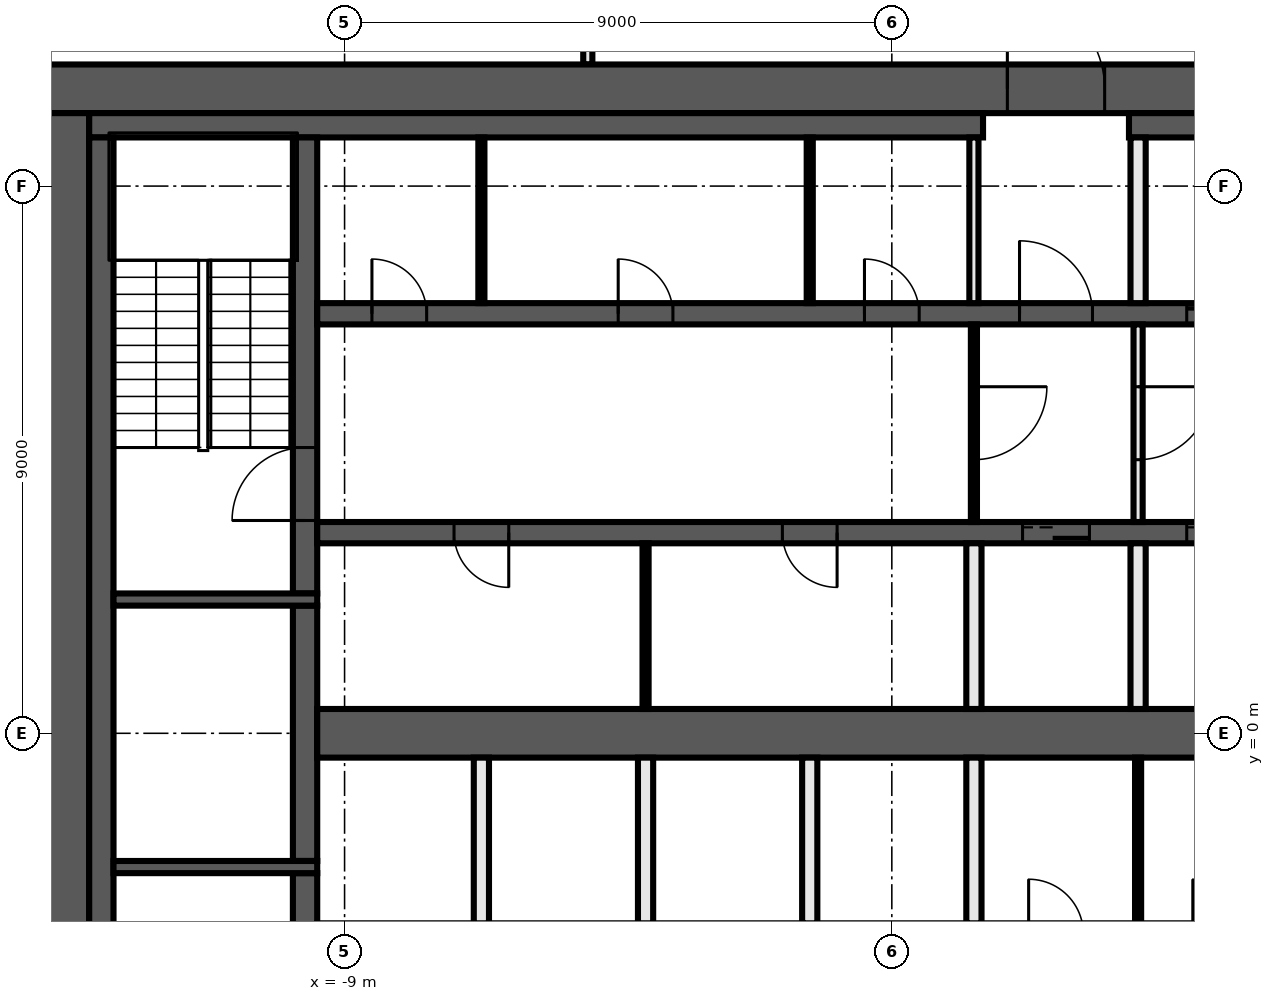
"""IFC4 building model, lengths in metres.
Left out: names, types, materials, properties, quantities, classifications, styles, units other than length and angle.
Written with IfcOpenShell. Run it as: python <this file> out.ifc"""

import sys

from ifc_helpers import new_model, si_unit, direction, frame, frame_2d, origin, place, context, subcontext, project, spatial, rectangle, extrude, element, fill, save


model = new_model("IFC4")
c1 = context("Model", 3, precision=1e-05, world=origin(), true_north=direction((0.0, 1.0)))
c2 = subcontext(c1, "Body", "Model", "MODEL_VIEW")
j1 = project(units=[si_unit("LENGTHUNIT", "METRE"), si_unit("PLANEANGLEUNIT", "RADIAN")], contexts=[c1])
p1 = place(None, origin())
s1 = spatial("IfcSite", under=j1, at=p1, CompositionType="ELEMENT")
p2 = place(p1, origin())
s2 = spatial("IfcBuilding", under=s1, at=p2, CompositionType="ELEMENT")
p3 = place(p2, frame((0.0, 0.0, 198.8)))
s3 = spatial("IfcBuildingStorey", under=s2, at=p3, CompositionType="ELEMENT", Elevation=198.8)
p4 = place(p3, frame((-5.0, 11.0, 0.0), z_axis=(0.0, 0.0, 1.0), x_axis=(0.0, 1.0, 0.0)))
e1 = element("IfcWall", 1, at=p4, inside=s3, PredefinedType="PARTITIONING", context=c2, shape_type="SweptSolid", body=[
    extrude(rectangle(XDim=3.125, YDim=0.15, at=frame_2d((1.562, 0.0))), origin(), (0.0, 0.0, 1.0), 3.82),
])
p5 = place(p3, frame((-14.0, 10.6, 0.0), z_axis=(0.0, 0.0, 1.0), x_axis=(1.0, 0.0, 0.0)))
e2 = element("IfcWall", 2, at=p5, inside=s3, PredefinedType="SHEAR", context=c2, shape_type="SweptSolid", body=[
    extrude(rectangle(XDim=28.0, YDim=0.8, at=frame_2d((14.0, 0.0))), origin(), (0.0, 0.0, 1.0), 3.82),
])
p6 = place(p5, frame((15.9, 0.0, 0.0)))
e3 = element("IfcOpeningElement", 3, at=p6, cuts=e2, PredefinedType="OPENING", context=c2, shape_type="SweptSolid", body=[
    extrude(rectangle(XDim=1.6, YDim=2.1, at=frame_2d((0.8, 1.05))), frame((0.0, 0.41, 0.0), z_axis=(0.0, -1.0, 0.0), x_axis=(1.0, 0.0, 0.0)), (0.0, 0.0, 1.0), 0.82),
])
p7 = place(p3, frame((-13.6, -10.2, 0.0), z_axis=(0.0, 0.0, 1.0), x_axis=(0.0, 1.0, 0.0)))
e4 = element("IfcWall", 4, at=p7, inside=s3, PredefinedType="SHEAR", context=c2, shape_type="SweptSolid", body=[
    extrude(rectangle(XDim=20.4, YDim=0.8, at=frame_2d((10.2, 0.0))), origin(), (0.0, 0.0, 1.0), 3.82),
])
p8 = place(p3, frame((-13.2, 10.0, 0.0), z_axis=(0.0, 0.0, 1.0), x_axis=(1.0, 0.0, 0.0)))
e5 = element("IfcWall", 5, at=p8, inside=s3, PredefinedType="SHEAR", context=c2, shape_type="SweptSolid", body=[
    extrude(rectangle(XDim=14.7, YDim=0.4, at=frame_2d((7.35, 0.0))), origin(), (0.0, 0.0, 1.0), 3.82),
])
p9 = place(p3, frame((3.9, 10.0, 0.0), z_axis=(0.0, 0.0, 1.0), x_axis=(1.0, 0.0, 0.0)))
e6 = element("IfcWall", 6, at=p9, inside=s3, PredefinedType="SHEAR", context=c2, shape_type="SweptSolid", body=[
    extrude(rectangle(XDim=9.3, YDim=0.4, at=frame_2d((4.65, 0.0))), origin(), (0.0, 0.0, 1.0), 3.82),
])
p10 = place(p3, frame((-13.0, -9.8, 0.0), z_axis=(0.0, 0.0, 1.0), x_axis=(0.0, 1.0, 0.0)))
e7 = element("IfcWall", 7, at=p10, inside=s3, PredefinedType="SHEAR", context=c2, shape_type="SweptSolid", body=[
    extrude(rectangle(XDim=19.6, YDim=0.4, at=frame_2d((9.8, 0.0))), origin(), (0.0, 0.0, 1.0), 3.82),
])
p11 = place(p3, frame((-9.65, -9.8, 0.0), z_axis=(0.0, 0.0, 1.0), x_axis=(0.0, 1.0, 0.0)))
e8 = element("IfcWall", 8, at=p11, inside=s3, PredefinedType="SHEAR", context=c2, shape_type="SweptSolid", body=[
    extrude(rectangle(XDim=7.5, YDim=0.4, at=frame_2d((3.75, 0.0))), origin(), (0.0, 0.0, 1.0), 3.82),
])
p12 = place(p11, frame((5.1, 0.0, 0.0)))
e9 = element("IfcOpeningElement", 9, at=p12, cuts=e8, PredefinedType="OPENING", context=c2, shape_type="SweptSolid", body=[
    extrude(rectangle(XDim=1.2, YDim=2.1, at=frame_2d((0.6, 1.05))), frame((0.0, 0.21, 0.0), z_axis=(0.0, -1.0, 0.0), x_axis=(1.0, 0.0, 0.0)), (0.0, 0.0, 1.0), 0.42),
])
p13 = place(p3, frame((-9.65, -2.1, 0.0), z_axis=(0.0, 0.0, 1.0), x_axis=(0.0, 1.0, 0.0)))
e10 = element("IfcWall", 10, at=p13, inside=s3, PredefinedType="SHEAR", context=c2, shape_type="SweptSolid", body=[
    extrude(rectangle(XDim=4.2, YDim=0.4, at=frame_2d((2.1, 0.0))), origin(), (0.0, 0.0, 1.0), 3.82),
])
p14 = place(p3, frame((-9.65, 2.3, 0.0), z_axis=(0.0, 0.0, 1.0), x_axis=(0.0, 1.0, 0.0)))
e11 = element("IfcWall", 11, at=p14, inside=s3, PredefinedType="SHEAR", context=c2, shape_type="SweptSolid", body=[
    extrude(rectangle(XDim=7.5, YDim=0.4, at=frame_2d((3.75, 0.0))), origin(), (0.0, 0.0, 1.0), 3.82),
])
p15 = place(p14, frame((1.2, 0.0, 0.0)))
e12 = element("IfcOpeningElement", 12, at=p15, cuts=e11, PredefinedType="OPENING", context=c2, shape_type="SweptSolid", body=[
    extrude(rectangle(XDim=1.2, YDim=2.1, at=frame_2d((0.6, 1.05))), frame((0.0, 0.21, 0.0), z_axis=(0.0, -1.0, 0.0), x_axis=(1.0, 0.0, 0.0)), (0.0, 0.0, 1.0), 0.42),
])
for number, where, z_axis, x_axis in (
    (13, (-9.45, 2.2, 0.0), (0.0, 0.0, 1.0), (-1.0, 0.0, 0.0)),
    (14, (-9.45, -2.2, 0.0), (0.0, 0.0, 1.0), (-1.0, 0.0, 0.0)),
):
    element("IfcWall", number, at=place(p3, frame(where, z_axis=z_axis, x_axis=x_axis)), inside=s3, PredefinedType="SHEAR", context=c2, shape_type="SweptSolid", body=[
        extrude(rectangle(XDim=3.35, YDim=0.2, at=frame_2d((1.675, 0.0))), origin(), (0.0, 0.0, 1.0), 3.82),
    ])
p16 = place(p3, frame((-9.45, 6.9, 0.0), z_axis=(0.0, 0.0, 1.0), x_axis=(1.0, 0.0, 0.0)))
e15 = element("IfcWall", 15, at=p16, inside=s3, PredefinedType="SHEAR", context=c2, shape_type="SweptSolid", body=[
    extrude(rectangle(XDim=18.9, YDim=0.35, at=frame_2d((9.45, 0.0))), origin(), (0.0, 0.0, 1.0), 3.82),
])
p17 = place(p16, frame((11.55, 0.0, 0.0)))
e16 = element("IfcOpeningElement", 16, at=p17, cuts=e15, PredefinedType="OPENING", context=c2, shape_type="SweptSolid", body=[
    extrude(rectangle(XDim=1.2, YDim=2.1, at=frame_2d((0.6, 1.05))), frame((0.0, 0.185, 0.0), z_axis=(0.0, -1.0, 0.0), x_axis=(1.0, 0.0, 0.0)), (0.0, 0.0, 1.0), 0.37),
])
p18 = place(p16, frame((14.3, 0.0, 0.0)))
e17 = element("IfcOpeningElement", 17, at=p18, cuts=e15, PredefinedType="OPENING", context=c2, shape_type="SweptSolid", body=[
    extrude(rectangle(XDim=1.1, YDim=2.1, at=frame_2d((0.55, 1.05))), frame((0.0, 0.185, 0.0), z_axis=(0.0, -1.0, 0.0), x_axis=(1.0, 0.0, 0.0)), (0.0, 0.0, 1.0), 0.37),
])
p19 = place(p16, frame((17.0, 0.0, 0.0)))
e18 = element("IfcOpeningElement", 18, at=p19, cuts=e15, PredefinedType="OPENING", context=c2, shape_type="SweptSolid", body=[
    extrude(rectangle(XDim=1.1, YDim=2.1, at=frame_2d((0.55, 1.05))), frame((0.0, 0.185, 0.0), z_axis=(0.0, -1.0, 0.0), x_axis=(1.0, 0.0, 0.0)), (0.0, 0.0, 1.0), 0.37),
])
p20 = place(p16, frame((0.9, 0.0, 0.0)))
e19 = element("IfcOpeningElement", 19, at=p20, cuts=e15, PredefinedType="OPENING", context=c2, shape_type="SweptSolid", body=[
    extrude(rectangle(XDim=0.9, YDim=2.1, at=frame_2d((0.45, 1.05))), frame((0.0, 0.185, 0.0), z_axis=(0.0, -1.0, 0.0), x_axis=(1.0, 0.0, 0.0)), (0.0, 0.0, 1.0), 0.37),
])
p21 = place(p16, frame((4.95, 0.0, 0.0)))
e20 = element("IfcOpeningElement", 20, at=p21, cuts=e15, PredefinedType="OPENING", context=c2, shape_type="SweptSolid", body=[
    extrude(rectangle(XDim=0.9, YDim=2.1, at=frame_2d((0.45, 1.05))), frame((0.0, 0.185, 0.0), z_axis=(0.0, -1.0, 0.0), x_axis=(1.0, 0.0, 0.0)), (0.0, 0.0, 1.0), 0.37),
])
p22 = place(p16, frame((9.0, 0.0, 0.0)))
e21 = element("IfcOpeningElement", 21, at=p22, cuts=e15, PredefinedType="OPENING", context=c2, shape_type="SweptSolid", body=[
    extrude(rectangle(XDim=0.9, YDim=2.1, at=frame_2d((0.45, 1.05))), frame((0.0, 0.185, 0.0), z_axis=(0.0, -1.0, 0.0), x_axis=(1.0, 0.0, 0.0)), (0.0, 0.0, 1.0), 0.37),
])
p23 = place(p3, frame((9.45, 3.3, 0.0), z_axis=(0.0, 0.0, 1.0), x_axis=(-1.0, 0.0, 0.0)))
e22 = element("IfcWall", 22, at=p23, inside=s3, PredefinedType="SHEAR", context=c2, shape_type="SweptSolid", body=[
    extrude(rectangle(XDim=18.9, YDim=0.35, at=frame_2d((9.45, 0.0))), origin(), (0.0, 0.0, 1.0), 3.82),
])
p24 = place(p23, frame((6.2, 0.0, 0.0)))
e23 = element("IfcOpeningElement", 23, at=p24, cuts=e22, PredefinedType="OPENING", context=c2, shape_type="SweptSolid", body=[
    extrude(rectangle(XDim=1.1, YDim=2.1, at=frame_2d((0.55, 1.05))), frame((0.0, 0.185, 0.0), z_axis=(0.0, -1.0, 0.0), x_axis=(1.0, 0.0, 0.0)), (0.0, 0.0, 1.0), 0.37),
])
p25 = place(p23, frame((3.5, 0.0, 0.0)))
e24 = element("IfcOpeningElement", 24, at=p25, cuts=e22, PredefinedType="OPENING", context=c2, shape_type="SweptSolid", body=[
    extrude(rectangle(XDim=1.1, YDim=2.1, at=frame_2d((0.55, 1.05))), frame((0.0, 0.185, 0.0), z_axis=(0.0, -1.0, 0.0), x_axis=(1.0, 0.0, 0.0)), (0.0, 0.0, 1.0), 0.37),
])
p26 = place(p23, frame((0.9, 0.0, 0.0)))
e25 = element("IfcOpeningElement", 25, at=p26, cuts=e22, PredefinedType="OPENING", context=c2, shape_type="SweptSolid", body=[
    extrude(rectangle(XDim=0.9, YDim=2.1, at=frame_2d((0.45, 1.05))), frame((0.0, 0.185, 0.0), z_axis=(0.0, -1.0, 0.0), x_axis=(1.0, 0.0, 0.0)), (0.0, 0.0, 1.0), 0.37),
])
p27 = place(p23, frame((15.75, 0.0, 0.0)))
e26 = element("IfcOpeningElement", 26, at=p27, cuts=e22, PredefinedType="OPENING", context=c2, shape_type="SweptSolid", body=[
    extrude(rectangle(XDim=0.9, YDim=2.1, at=frame_2d((0.45, 1.05))), frame((0.0, 0.185, 0.0), z_axis=(0.0, -1.0, 0.0), x_axis=(1.0, 0.0, 0.0)), (0.0, 0.0, 1.0), 0.37),
])
p28 = place(p23, frame((10.35, 0.0, 0.0)))
e27 = element("IfcOpeningElement", 27, at=p28, cuts=e22, PredefinedType="OPENING", context=c2, shape_type="SweptSolid", body=[
    extrude(rectangle(XDim=0.9, YDim=2.1, at=frame_2d((0.45, 1.05))), frame((0.0, 0.185, 0.0), z_axis=(0.0, -1.0, 0.0), x_axis=(1.0, 0.0, 0.0)), (0.0, 0.0, 1.0), 0.37),
])
p29 = place(p3, frame((-9.45, 0.0, 0.0), z_axis=(0.0, 0.0, 1.0), x_axis=(1.0, 0.0, 0.0)))
e28 = element("IfcWall", 28, at=p29, inside=s3, PredefinedType="SHEAR", context=c2, shape_type="SweptSolid", body=[
    extrude(rectangle(XDim=18.9, YDim=0.8, at=frame_2d((9.45, 0.0))), origin(), (0.0, 0.0, 1.0), 3.82),
])
p30 = place(p3, frame((4.05, 6.725, 0.0), z_axis=(0.0, 0.0, 1.0), x_axis=(0.0, -1.0, 0.0)))
e29 = element("IfcWall", 29, at=p30, inside=s3, PredefinedType="PARTITIONING", context=c2, shape_type="SweptSolid", body=[
    extrude(rectangle(XDim=3.25, YDim=0.15, at=frame_2d((1.625, 0.0))), origin(), (0.0, 0.0, 1.0), 3.82),
])
p31 = place(p30, frame((1.025, 0.0, 0.0)))
e30 = element("IfcOpeningElement", 30, at=p31, cuts=e29, PredefinedType="OPENING", context=c2, shape_type="SweptSolid", body=[
    extrude(rectangle(XDim=1.2, YDim=2.1, at=frame_2d((0.6, 1.05))), frame((0.0, 0.085, 0.0), z_axis=(0.0, -1.0, 0.0), x_axis=(1.0, 0.0, 0.0)), (0.0, 0.0, 1.0), 0.17),
])
p32 = place(p3, frame((4.05, -3.125, 0.0), z_axis=(0.0, 0.0, 1.0), x_axis=(0.0, 1.0, 0.0)))
e31 = element("IfcWall", 31, at=p32, inside=s3, PredefinedType="PARTITIONING", context=c2, shape_type="SweptSolid", body=[
    extrude(rectangle(XDim=2.725, YDim=0.1, at=frame_2d((1.363, 0.0))), origin(), (0.0, 0.0, 1.0), 3.82),
])
for number, where, z_axis, x_axis in (
    (32, (4.05, 0.4, 0.0), (0.0, 0.0, 1.0), (0.0, 1.0, 0.0)),
    (33, (4.05, 7.075, 0.0), (0.0, 0.0, 1.0), (0.0, 1.0, 0.0)),
):
    element("IfcWall", number, at=place(p3, frame(where, z_axis=z_axis, x_axis=x_axis)), inside=s3, PredefinedType="SOLIDWALL", context=c2, shape_type="SweptSolid", body=[
        extrude(rectangle(XDim=2.725, YDim=0.25, at=frame_2d((1.363, 0.0))), origin(), (0.0, 0.0, 1.0), 3.82),
    ])
p33 = place(p3, frame((1.35, 7.075, 0.0), z_axis=(0.0, 0.0, 1.0), x_axis=(0.0, 1.0, 0.0)))
e34 = element("IfcWall", 34, at=p33, inside=s3, PredefinedType="PARTITIONING", context=c2, shape_type="SweptSolid", body=[
    extrude(rectangle(XDim=2.725, YDim=0.15, at=frame_2d((1.363, 0.0))), origin(), (0.0, 0.0, 1.0), 3.82),
])
p34 = place(p3, frame((1.35, 6.725, 0.0), z_axis=(0.0, 0.0, 1.0), x_axis=(0.0, -1.0, 0.0)))
e35 = element("IfcWall", 35, at=p34, inside=s3, PredefinedType="PARTITIONING", context=c2, shape_type="SweptSolid", body=[
    extrude(rectangle(XDim=3.25, YDim=0.1, at=frame_2d((1.625, 0.0))), origin(), (0.0, 0.0, 1.0), 3.82),
])
p35 = place(p34, frame((1.025, 0.0, 0.0)))
e36 = element("IfcOpeningElement", 36, at=p35, cuts=e35, PredefinedType="OPENING", context=c2, shape_type="SweptSolid", body=[
    extrude(rectangle(XDim=1.2, YDim=2.1, at=frame_2d((0.6, 1.05))), frame((0.0, 0.06, 0.0), z_axis=(0.0, -1.0, 0.0), x_axis=(1.0, 0.0, 0.0)), (0.0, 0.0, 1.0), 0.12),
])
for number, where, z_axis, x_axis in (
    (37, (1.35, -3.125, 0.0), (0.0, 0.0, 1.0), (0.0, 1.0, 0.0)),
    (38, (1.35, 0.4, 0.0), (0.0, 0.0, 1.0), (0.0, 1.0, 0.0)),
):
    element("IfcWall", number, at=place(p3, frame(where, z_axis=z_axis, x_axis=x_axis)), inside=s3, PredefinedType="SOLIDWALL", context=c2, shape_type="SweptSolid", body=[
        extrude(rectangle(XDim=2.725, YDim=0.25, at=frame_2d((1.363, 0.0))), origin(), (0.0, 0.0, 1.0), 3.82),
    ])
p36 = place(p3, frame((-1.35, 7.075, 0.0), z_axis=(0.0, 0.0, 1.0), x_axis=(0.0, 1.0, 0.0)))
e39 = element("IfcWall", 39, at=p36, inside=s3, PredefinedType="PARTITIONING", context=c2, shape_type="SweptSolid", body=[
    extrude(rectangle(XDim=2.725, YDim=0.1, at=frame_2d((1.363, 0.0))), origin(), (0.0, 0.0, 1.0), 3.82),
])
p37 = place(p3, frame((-1.35, -3.125, 0.0), z_axis=(0.0, 0.0, 1.0), x_axis=(0.0, 1.0, 0.0)))
e40 = element("IfcWall", 40, at=p37, inside=s3, PredefinedType="SOLIDWALL", context=c2, shape_type="SweptSolid", body=[
    extrude(rectangle(XDim=2.725, YDim=0.25, at=frame_2d((1.363, 0.0))), origin(), (0.0, 0.0, 1.0), 3.82),
])
p38 = place(p3, frame((-4.05, 0.4, 0.0), z_axis=(0.0, 0.0, 1.0), x_axis=(0.0, 1.0, 0.0)))
e41 = element("IfcWall", 41, at=p38, inside=s3, PredefinedType="PARTITIONING", context=c2, shape_type="SweptSolid", body=[
    extrude(rectangle(XDim=2.725, YDim=0.1, at=frame_2d((1.363, 0.0))), origin(), (0.0, 0.0, 1.0), 3.82),
])
p39 = place(p3, frame((-4.05, -3.125, 0.0), z_axis=(0.0, 0.0, 1.0), x_axis=(0.0, 1.0, 0.0)))
e42 = element("IfcWall", 42, at=p39, inside=s3, PredefinedType="SOLIDWALL", context=c2, shape_type="SweptSolid", body=[
    extrude(rectangle(XDim=2.725, YDim=0.25, at=frame_2d((1.363, 0.0))), origin(), (0.0, 0.0, 1.0), 3.82),
])
p40 = place(p3, frame((-6.75, 7.075, 0.0), z_axis=(0.0, 0.0, 1.0), x_axis=(0.0, 1.0, 0.0)))
e43 = element("IfcWall", 43, at=p40, inside=s3, PredefinedType="PARTITIONING", context=c2, shape_type="SweptSolid", body=[
    extrude(rectangle(XDim=2.725, YDim=0.1, at=frame_2d((1.363, 0.0))), origin(), (0.0, 0.0, 1.0), 3.82),
])
p41 = place(p3, frame((-6.75, -3.125, 0.0), z_axis=(0.0, 0.0, 1.0), x_axis=(0.0, 1.0, 0.0)))
e44 = element("IfcWall", 44, at=p41, inside=s3, PredefinedType="SOLIDWALL", context=c2, shape_type="SweptSolid", body=[
    extrude(rectangle(XDim=2.725, YDim=0.25, at=frame_2d((1.363, 0.0))), origin(), (0.0, 0.0, 1.0), 3.82),
])
p42 = place(p6, origin())
e45 = element("IfcDoor", 45, at=p42, inside=s3, OperationType="DOUBLE_DOOR_SINGLE_SWING", PredefinedType="DOOR", context=c2, shape_type="SweptSolid", body=[
    extrude(rectangle(XDim=1.6, YDim=2.1, at=frame_2d((0.8, 1.05))), frame((0.0, 0.025, 0.0), z_axis=(0.0, -1.0, 0.0), x_axis=(1.0, 0.0, 0.0)), (0.0, 0.0, 1.0), 0.05),
])
fill(e3, e45)
p43 = place(p17, origin())
e46 = element("IfcDoor", 46, at=p43, inside=s3, OperationType="SINGLE_SWING_LEFT", PredefinedType="DOOR", context=c2, shape_type="SweptSolid", body=[
    extrude(rectangle(XDim=1.2, YDim=2.1, at=frame_2d((0.6, 1.05))), frame((0.0, 0.025, 0.0), z_axis=(0.0, -1.0, 0.0), x_axis=(1.0, 0.0, 0.0)), (0.0, 0.0, 1.0), 0.05),
])
fill(e16, e46)
p44 = place(p18, origin())
e47 = element("IfcDoor", 47, at=p44, inside=s3, OperationType="DOUBLE_DOOR_SLIDING", PredefinedType="DOOR", context=c2, shape_type="SweptSolid", body=[
    extrude(rectangle(XDim=1.1, YDim=2.1, at=frame_2d((0.55, 1.05))), frame((0.0, 0.025, 0.0), z_axis=(0.0, -1.0, 0.0), x_axis=(1.0, 0.0, 0.0)), (0.0, 0.0, 1.0), 0.05),
])
fill(e17, e47)
p45 = place(p24, origin())
e48 = element("IfcDoor", 48, at=p45, inside=s3, OperationType="DOUBLE_DOOR_SLIDING", PredefinedType="DOOR", context=c2, shape_type="SweptSolid", body=[
    extrude(rectangle(XDim=1.1, YDim=2.1, at=frame_2d((0.55, 1.05))), frame((0.0, 0.025, 0.0), z_axis=(0.0, -1.0, 0.0), x_axis=(1.0, 0.0, 0.0)), (0.0, 0.0, 1.0), 0.05),
])
fill(e23, e48)
p46 = place(p25, origin())
e49 = element("IfcDoor", 49, at=p46, inside=s3, OperationType="DOUBLE_DOOR_SLIDING", PredefinedType="DOOR", context=c2, shape_type="SweptSolid", body=[
    extrude(rectangle(XDim=1.1, YDim=2.1, at=frame_2d((0.55, 1.05))), frame((0.0, 0.025, 0.0), z_axis=(0.0, -1.0, 0.0), x_axis=(1.0, 0.0, 0.0)), (0.0, 0.0, 1.0), 0.05),
])
fill(e24, e49)
p47 = place(p20, origin())
e50 = element("IfcDoor", 50, at=p47, inside=s3, OperationType="SINGLE_SWING_RIGHT", PredefinedType="DOOR", context=c2, shape_type="SweptSolid", body=[
    extrude(rectangle(XDim=0.9, YDim=2.1, at=frame_2d((0.45, 1.05))), frame((0.0, 0.025, 0.0), z_axis=(0.0, -1.0, 0.0), x_axis=(1.0, 0.0, 0.0)), (0.0, 0.0, 1.0), 0.05),
])
fill(e19, e50)
p48 = place(p21, origin())
e51 = element("IfcDoor", 51, at=p48, inside=s3, OperationType="SINGLE_SWING_LEFT", PredefinedType="DOOR", context=c2, shape_type="SweptSolid", body=[
    extrude(rectangle(XDim=0.9, YDim=2.1, at=frame_2d((0.45, 1.05))), frame((0.0, 0.025, 0.0), z_axis=(0.0, -1.0, 0.0), x_axis=(1.0, 0.0, 0.0)), (0.0, 0.0, 1.0), 0.05),
])
fill(e20, e51)
p49 = place(p22, origin())
e52 = element("IfcDoor", 52, at=p49, inside=s3, OperationType="SINGLE_SWING_RIGHT", PredefinedType="DOOR", context=c2, shape_type="SweptSolid", body=[
    extrude(rectangle(XDim=0.9, YDim=2.1, at=frame_2d((0.45, 1.05))), frame((0.0, 0.025, 0.0), z_axis=(0.0, -1.0, 0.0), x_axis=(1.0, 0.0, 0.0)), (0.0, 0.0, 1.0), 0.05),
])
fill(e21, e52)
p50 = place(p27, origin())
e53 = element("IfcDoor", 53, at=p50, inside=s3, OperationType="SINGLE_SWING_LEFT", PredefinedType="DOOR", context=c2, shape_type="SweptSolid", body=[
    extrude(rectangle(XDim=0.9, YDim=2.1, at=frame_2d((0.45, 1.05))), frame((0.0, 0.025, 0.0), z_axis=(0.0, -1.0, 0.0), x_axis=(1.0, 0.0, 0.0)), (0.0, 0.0, 1.0), 0.05),
])
fill(e26, e53)
p51 = place(p28, origin())
e54 = element("IfcDoor", 54, at=p51, inside=s3, OperationType="SINGLE_SWING_RIGHT", PredefinedType="DOOR", context=c2, shape_type="SweptSolid", body=[
    extrude(rectangle(XDim=0.9, YDim=2.1, at=frame_2d((0.45, 1.05))), frame((0.0, 0.025, 0.0), z_axis=(0.0, -1.0, 0.0), x_axis=(1.0, 0.0, 0.0)), (0.0, 0.0, 1.0), 0.05),
])
fill(e27, e54)
p52 = place(p15, origin())
e55 = element("IfcDoor", 55, at=p52, inside=s3, OperationType="SINGLE_SWING_RIGHT", PredefinedType="DOOR", context=c2, shape_type="SweptSolid", body=[
    extrude(rectangle(XDim=1.2, YDim=2.1, at=frame_2d((0.6, 1.05))), frame((0.0, 0.025, 0.0), z_axis=(0.0, -1.0, 0.0), x_axis=(1.0, 0.0, 0.0)), (0.0, 0.0, 1.0), 0.05),
])
fill(e12, e55)
p53 = place(p35, origin())
e56 = element("IfcDoor", 56, at=p53, inside=s3, OperationType="SINGLE_SWING_LEFT", PredefinedType="DOOR", context=c2, shape_type="SweptSolid", body=[
    extrude(rectangle(XDim=1.2, YDim=2.1, at=frame_2d((0.6, 1.05))), frame((0.0, 0.025, 0.0), z_axis=(0.0, -1.0, 0.0), x_axis=(1.0, 0.0, 0.0)), (0.0, 0.0, 1.0), 0.05),
])
fill(e36, e56)
p54 = place(p31, origin())
e57 = element("IfcDoor", 57, at=p54, inside=s3, OperationType="SINGLE_SWING_RIGHT", PredefinedType="DOOR", context=c2, shape_type="SweptSolid", body=[
    extrude(rectangle(XDim=1.2, YDim=2.1, at=frame_2d((0.6, 1.05))), frame((0.0, 0.025, 0.0), z_axis=(0.0, -1.0, 0.0), x_axis=(1.0, 0.0, 0.0)), (0.0, 0.0, 1.0), 0.05),
])
fill(e30, e57)
save(model, sys.argv[1])
